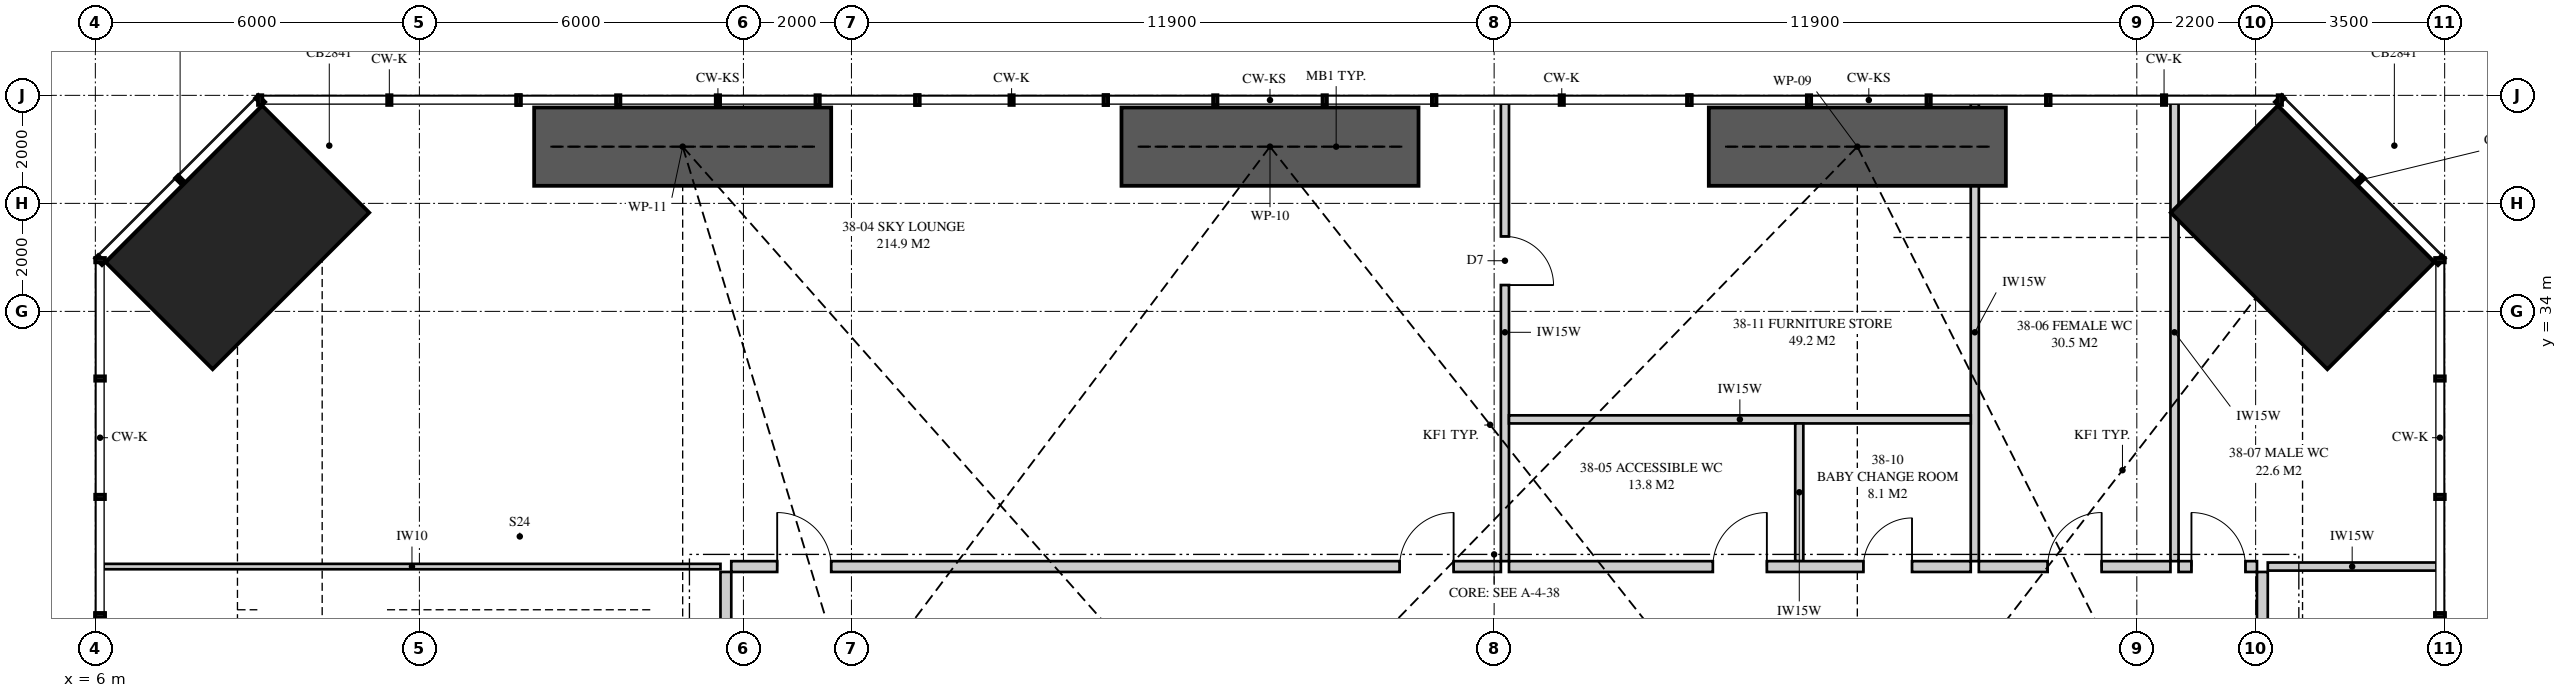
"""IFC4 building model, lengths in metres.
Left out: names, types, materials, properties, quantities, classifications, styles, units other than length and angle.
Written with IfcOpenShell. Run it as: python <this file> out.ifc"""

import sys

from ifc_helpers import new_model, si_unit, direction, frame, frame_2d, origin, origin_2d, place, context, subcontext, project, spatial, polyline, rectangle, hollow_rectangle, outline, extrude, element, fill, save


model = new_model("IFC4")
c1 = context("Model", 3, precision=1e-05, world=origin(), true_north=direction((0.0, 1.0)))
c2 = subcontext(c1, "Body", "Model", "MODEL_VIEW")
j1 = project(units=[si_unit("LENGTHUNIT", "METRE"), si_unit("PLANEANGLEUNIT", "RADIAN")], contexts=[c1])
p1 = place(None, origin())
s1 = spatial("IfcSite", under=j1, at=p1, CompositionType="ELEMENT")
p2 = place(p1, origin())
s2 = spatial("IfcBuilding", under=s1, at=p2, CompositionType="ELEMENT")
p3 = place(p2, frame((0.0, 0.0, 138.35)))
s3 = spatial("IfcBuildingStorey", under=s2, at=p3, CompositionType="ELEMENT", Elevation=138.35)
for number, where, z_axis, x_axis in (
    (1, (46.869, 35.369, 0.0), (0.0, 0.0, 1.0), (-0.707, -0.707, 0.0)),
    (2, (8.631, 35.369, 0.0), (0.0, 0.0, 1.0), (0.707, -0.707, 0.0)),
):
    element("IfcColumn", number, at=place(p3, frame(where, z_axis=z_axis, x_axis=x_axis)), inside=s3, PredefinedType="COLUMN", context=c2, shape_type="SweptSolid", body=[
        extrude(hollow_rectangle(XDim=2.8, YDim=4.1, WallThickness=0.125, at=origin_2d()), origin(), (0.0, 0.0, 1.0), 6.0),
    ])
p4 = place(p3, frame((17.775, 29.275, 0.0), z_axis=(0.0, 0.0, 1.0), x_axis=(1.0, 0.0, 0.0)))
e3 = element("IfcWall", 3, at=p4, inside=s3, PredefinedType="PARTITIONING", context=c2, shape_type="SweptSolid", body=[
    extrude(outline(polyline([(0.0, 0.0), (14.25, 0.0), (14.25, 5.72), (13.709, 5.72), (13.709, 5.141), (12.856, 5.141), (12.856, 5.72), (10.26, 5.72), (10.26, 5.208), (9.69, 5.208), (9.69, 5.72), (6.392, 5.72), (6.392, 5.141), (5.584, 5.141), (5.584, 5.72), (4.496, 5.72), (4.496, 5.141), (3.754, 5.141), (3.754, 5.72), (1.736, 5.72), (1.736, 5.141), (1.182, 5.141), (1.182, 5.72), (0.0, 5.72), (0.0, 0.0)])), frame((0.0, 0.1, 0.0), z_axis=(0.0, -1.0, 0.0), x_axis=(1.0, 0.0, 0.0)), (0.0, 0.0, 1.0), 0.2),
])
p5 = place(p4, frame((0.85, 0.0, 0.0)))
e4 = element("IfcOpeningElement", 4, at=p5, cuts=e3, PredefinedType="OPENING", context=c2, shape_type="SweptSolid", body=[
    extrude(rectangle(XDim=1.0, YDim=2.1, at=frame_2d((0.5, 1.05))), frame((0.0, 0.11, 0.0), z_axis=(0.0, -1.0, 0.0), x_axis=(1.0, 0.0, 0.0)), (0.0, 0.0, 1.0), 0.22),
])
p6 = place(p4, frame((12.375, 0.0, 0.0)))
e5 = element("IfcOpeningElement", 5, at=p6, cuts=e3, PredefinedType="OPENING", context=c2, shape_type="SweptSolid", body=[
    extrude(rectangle(XDim=1.0, YDim=2.1, at=frame_2d((0.5, 1.05))), frame((0.0, 0.11, 0.0), z_axis=(0.0, -1.0, 0.0), x_axis=(1.0, 0.0, 0.0)), (0.0, 0.0, 1.0), 0.22),
])
p7 = place(p3, frame((32.175, 29.275, 0.0), z_axis=(0.0, 0.0, 1.0), x_axis=(1.0, 0.0, 0.0)))
e6 = element("IfcWall", 6, at=p7, inside=s3, PredefinedType="PARTITIONING", context=c2, shape_type="SweptSolid", body=[
    extrude(outline(polyline([(0.0, 0.0), (8.55, 0.0), (8.55, 5.72), (7.16, 5.72), (7.16, 5.12), (5.74, 5.12), (5.74, 5.72), (2.107, 5.72), (2.107, 5.141), (1.347, 5.141), (1.347, 5.72), (0.0, 5.72), (0.0, 0.0)])), frame((0.0, 0.1, 0.0), z_axis=(0.0, -1.0, 0.0), x_axis=(1.0, 0.0, 0.0)), (0.0, 0.0, 1.0), 0.2),
])
p8 = place(p7, frame((3.775, 0.0, 0.0)))
e7 = element("IfcOpeningElement", 7, at=p8, cuts=e6, PredefinedType="OPENING", context=c2, shape_type="SweptSolid", body=[
    extrude(rectangle(XDim=1.0, YDim=2.1, at=frame_2d((0.5, 1.05))), frame((0.0, 0.11, 0.0), z_axis=(0.0, -1.0, 0.0), x_axis=(1.0, 0.0, 0.0)), (0.0, 0.0, 1.0), 0.22),
])
p9 = place(p7, frame((6.562, 0.0, 0.0)))
e8 = element("IfcOpeningElement", 8, at=p9, cuts=e6, PredefinedType="OPENING", context=c2, shape_type="SweptSolid", body=[
    extrude(rectangle(XDim=0.9, YDim=2.1, at=frame_2d((0.45, 1.05))), frame((0.0, 0.11, 0.0), z_axis=(0.0, -1.0, 0.0), x_axis=(1.0, 0.0, 0.0)), (0.0, 0.0, 1.0), 0.22),
])
p10 = place(p3, frame((40.875, 29.275, 0.0), z_axis=(0.0, 0.0, 1.0), x_axis=(1.0, 0.0, 0.0)))
e9 = element("IfcWall", 9, at=p10, inside=s3, PredefinedType="PARTITIONING", context=c2, shape_type="SweptSolid", body=[
    extrude(outline(polyline([(0.0, 0.0), (3.548, 0.0), (3.548, 5.72), (1.971, 5.72), (1.971, 5.141), (0.903, 5.141), (0.903, 5.72), (0.0, 5.72), (0.0, 0.0)])), frame((0.0, 0.1, 0.0), z_axis=(0.0, -1.0, 0.0), x_axis=(1.0, 0.0, 0.0)), (0.0, 0.0, 1.0), 0.2),
])
p11 = place(p10, frame((1.274, 0.0, 0.0)))
e10 = element("IfcOpeningElement", 10, at=p11, cuts=e9, PredefinedType="OPENING", context=c2, shape_type="SweptSolid", body=[
    extrude(rectangle(XDim=1.0, YDim=2.1, at=frame_2d((0.5, 1.05))), frame((0.0, 0.11, 0.0), z_axis=(0.0, -1.0, 0.0), x_axis=(1.0, 0.0, 0.0)), (0.0, 0.0, 1.0), 0.22),
])
p12 = place(p3, frame((44.573, 29.275, 0.0), z_axis=(0.0, 0.0, 1.0), x_axis=(1.0, 0.0, 0.0)))
e11 = element("IfcWall", 11, at=p12, inside=s3, PredefinedType="PARTITIONING", context=c2, shape_type="SweptSolid", body=[
    extrude(rectangle(XDim=1.452, YDim=0.2, at=frame_2d((0.726, 0.0))), origin(), (0.0, 0.0, 1.0), 5.72),
])
p13 = place(p12, frame((0.239, 0.0, 0.0)))
e12 = element("IfcOpeningElement", 12, at=p13, cuts=e11, PredefinedType="OPENING", context=c2, shape_type="SweptSolid", body=[
    extrude(rectangle(XDim=1.0, YDim=2.1, at=frame_2d((0.5, 1.05))), frame((0.0, 0.11, 0.0), z_axis=(0.0, -1.0, 0.0), x_axis=(1.0, 0.0, 0.0)), (0.0, 0.0, 1.0), 0.22),
])
for number, where, z_axis, x_axis in (
    (13, (17.675, 27.625, 0.0), (0.0, 0.0, 1.0), (0.0, 1.0, 0.0)),
    (14, (46.125, 27.625, 0.0), (0.0, 0.0, 1.0), (0.0, 1.0, 0.0)),
):
    element("IfcWall", number, at=place(p3, frame(where, z_axis=z_axis, x_axis=x_axis)), inside=s3, PredefinedType="PARTITIONING", context=c2, shape_type="SweptSolid", body=[
        extrude(rectangle(XDim=1.55, YDim=0.2, at=frame_2d((0.775, 0.0))), origin(), (0.0, 0.0, 1.0), 5.72),
    ])
p14 = place(p3, frame((32.1, 29.375, 0.0), z_axis=(0.0, 0.0, 1.0), x_axis=(0.0, 1.0, 0.0)))
e15 = element("IfcWall", 15, at=p14, inside=s3, PredefinedType="PLUMBINGWALL", context=c2, shape_type="SweptSolid", body=[
    extrude(outline(polyline([(0.0, 0.0), (8.475, 0.0), (8.475, 5.72), (8.375, 5.72), (8.375, 4.32), (6.975, 4.32), (6.975, 5.72), (2.653, 5.72), (2.653, 5.141), (1.702, 5.141), (1.702, 5.72), (1.387, 5.72), (1.387, 5.141), (0.555, 5.141), (0.555, 5.72), (0.0, 5.72), (0.0, 0.0)])), frame((0.0, 0.075, 0.0), z_axis=(0.0, -1.0, 0.0), x_axis=(1.0, 0.0, 0.0)), (0.0, 0.0, 1.0), 0.15),
])
p15 = place(p14, frame((5.113, 0.0, 0.0)))
e16 = element("IfcOpeningElement", 16, at=p15, cuts=e15, PredefinedType="OPENING", context=c2, shape_type="SweptSolid", body=[
    extrude(rectangle(XDim=0.9, YDim=2.1, at=frame_2d((0.45, 1.05))), frame((0.0, 0.085, 0.0), z_axis=(0.0, -1.0, 0.0), x_axis=(1.0, 0.0, 0.0)), (0.0, 0.0, 1.0), 0.17),
])
p16 = place(p3, frame((6.15, 29.275, 0.0), z_axis=(0.0, 0.0, 1.0), x_axis=(1.0, 0.0, 0.0)))
e17 = element("IfcWall", 17, at=p16, inside=s3, PredefinedType="PARTITIONING", context=c2, shape_type="SweptSolid", body=[
    extrude(outline(polyline([(0.0, 0.0), (11.425, 0.0), (11.425, 5.72), (11.385, 5.72), (11.385, 5.12), (10.065, 5.12), (10.065, 5.72), (5.31, 5.72), (5.31, 5.12), (2.841, 5.12), (2.841, 4.52), (2.21, 4.52), (2.21, 4.32), (0.776, 4.32), (0.776, 5.72), (0.0, 5.72), (0.0, 0.0)])), frame((0.0, 0.05, 0.0), z_axis=(0.0, -1.0, 0.0), x_axis=(1.0, 0.0, 0.0)), (0.0, 0.0, 1.0), 0.1),
])
p17 = place(p3, frame((40.8, 29.375, 0.0), z_axis=(0.0, 0.0, 1.0), x_axis=(0.0, 1.0, 0.0)))
e18 = element("IfcWall", 18, at=p17, inside=s3, PredefinedType="PLUMBINGWALL", context=c2, shape_type="SweptSolid", body=[
    extrude(outline(polyline([(2.671, 5.72), (0.0, 5.72), (0.0, 0.0), (7.429, 0.0), (7.429, 0.279), (7.921, 0.279), (7.921, 0.0), (8.475, 0.0), (8.475, 5.72), (7.961, 5.72), (7.961, 4.32), (6.502, 4.32), (6.502, 5.12), (5.309, 5.12), (5.309, 5.72), (4.021, 5.72), (4.021, 5.141), (2.671, 5.141), (2.671, 5.72)])), frame((0.0, 0.075, 0.0), z_axis=(0.0, -1.0, 0.0), x_axis=(1.0, 0.0, 0.0)), (0.0, 0.0, 1.0), 0.15),
])
p18 = place(p3, frame((44.498, 29.375, 0.0), z_axis=(0.0, 0.0, 1.0), x_axis=(0.0, 1.0, 0.0)))
e19 = element("IfcWall", 19, at=p18, inside=s3, PredefinedType="PLUMBINGWALL", context=c2, shape_type="SweptSolid", body=[
    extrude(outline(polyline([(0.0, 0.0), (8.475, 0.0), (8.475, 5.72), (7.207, 5.72), (7.207, 4.32), (5.747, 4.32), (5.747, 5.12), (5.309, 5.12), (5.309, 5.72), (3.413, 5.72), (3.413, 5.141), (2.447, 5.141), (2.447, 5.72), (0.0, 5.72), (0.0, 0.0)])), frame((0.0, 0.075, 0.0), z_axis=(0.0, -1.0, 0.0), x_axis=(1.0, 0.0, 0.0)), (0.0, 0.0, 1.0), 0.15),
])
p19 = place(p3, frame((46.225, 29.275, 0.0), z_axis=(0.0, 0.0, 1.0), x_axis=(1.0, 0.0, 0.0)))
e20 = element("IfcWall", 20, at=p19, inside=s3, PredefinedType="PLUMBINGWALL", context=c2, shape_type="SweptSolid", body=[
    extrude(outline(polyline([(0.0, 0.0), (3.125, 0.0), (3.125, 5.72), (2.353, 5.72), (2.353, 4.32), (0.91, 4.32), (0.91, 5.12), (0.0, 5.12), (0.0, 0.0)])), frame((0.0, 0.075, 0.0), z_axis=(0.0, -1.0, 0.0), x_axis=(1.0, 0.0, 0.0)), (0.0, 0.0, 1.0), 0.15),
])
p20 = place(p3, frame((32.175, 32.0, 0.0), z_axis=(0.0, 0.0, 1.0), x_axis=(1.0, 0.0, 0.0)))
e21 = element("IfcWall", 21, at=p20, inside=s3, PredefinedType="PLUMBINGWALL", context=c2, shape_type="SweptSolid", body=[
    extrude(outline(polyline([(0.0, 0.0), (8.55, 0.0), (8.55, 5.72), (7.135, 5.72), (7.135, 5.12), (5.765, 5.12), (5.765, 5.72), (1.938, 5.72), (1.938, 5.141), (1.132, 5.141), (1.132, 5.72), (0.0, 5.72), (0.0, 0.0)])), frame((0.0, 0.075, 0.0), z_axis=(0.0, -1.0, 0.0), x_axis=(1.0, 0.0, 0.0)), (0.0, 0.0, 1.0), 0.15),
])
p21 = place(p3, frame((37.55, 29.375, 0.0), z_axis=(0.0, 0.0, 1.0), x_axis=(0.0, 1.0, 0.0)))
e22 = element("IfcWall", 22, at=p21, inside=s3, PredefinedType="PLUMBINGWALL", context=c2, shape_type="SweptSolid", body=[
    extrude(rectangle(XDim=2.55, YDim=0.15, at=frame_2d((1.275, 0.0))), origin(), (0.0, 0.0, 1.0), 5.72),
])
for number, where, z_axis, x_axis in (
    (23, (35.875, 37.05, 0.0), (0.0, 0.0, 1.0), (1.0, 0.0, 0.0)),
    (24, (25.0, 37.05, 0.0), (0.0, 0.0, 1.0), (1.0, 0.0, 0.0)),
    (25, (14.125, 37.05, 0.0), (0.0, 0.0, 1.0), (1.0, 0.0, 0.0)),
):
    element("IfcWall", number, at=place(p3, frame(where, z_axis=z_axis, x_axis=x_axis)), inside=s3, PredefinedType="SHEAR", context=c2, shape_type="SweptSolid", body=[
        extrude(rectangle(XDim=5.5, YDim=1.45, at=frame_2d((2.75, 0.0))), origin(), (0.0, 0.0, 1.0), 6.0),
    ])
p22 = place(p5, origin())
e26 = element("IfcDoor", 26, at=p22, inside=s3, OperationType="SINGLE_SWING_LEFT", PredefinedType="DOOR", context=c2, shape_type="SweptSolid", body=[
    extrude(rectangle(XDim=1.0, YDim=2.1, at=frame_2d((0.5, 1.05))), frame((0.0, 0.025, 0.0), z_axis=(0.0, -1.0, 0.0), x_axis=(1.0, 0.0, 0.0)), (0.0, 0.0, 1.0), 0.05),
])
fill(e4, e26)
p23 = place(p6, origin())
e27 = element("IfcDoor", 27, at=p23, inside=s3, OperationType="SINGLE_SWING_RIGHT", PredefinedType="DOOR", context=c2, shape_type="SweptSolid", body=[
    extrude(rectangle(XDim=1.0, YDim=2.1, at=frame_2d((0.5, 1.05))), frame((0.0, 0.025, 0.0), z_axis=(0.0, -1.0, 0.0), x_axis=(1.0, 0.0, 0.0)), (0.0, 0.0, 1.0), 0.05),
])
fill(e5, e27)
p24 = place(p8, origin())
e28 = element("IfcDoor", 28, at=p24, inside=s3, OperationType="SINGLE_SWING_RIGHT", PredefinedType="DOOR", context=c2, shape_type="SweptSolid", body=[
    extrude(rectangle(XDim=1.0, YDim=2.1, at=frame_2d((0.5, 1.05))), frame((0.0, 0.025, 0.0), z_axis=(0.0, -1.0, 0.0), x_axis=(1.0, 0.0, 0.0)), (0.0, 0.0, 1.0), 0.05),
])
fill(e7, e28)
p25 = place(p11, origin())
e29 = element("IfcDoor", 29, at=p25, inside=s3, OperationType="SINGLE_SWING_RIGHT", PredefinedType="DOOR", context=c2, shape_type="SweptSolid", body=[
    extrude(rectangle(XDim=1.0, YDim=2.1, at=frame_2d((0.5, 1.05))), frame((0.0, 0.025, 0.0), z_axis=(0.0, -1.0, 0.0), x_axis=(1.0, 0.0, 0.0)), (0.0, 0.0, 1.0), 0.05),
])
fill(e10, e29)
p26 = place(p13, origin())
e30 = element("IfcDoor", 30, at=p26, inside=s3, OperationType="SINGLE_SWING_LEFT", PredefinedType="DOOR", context=c2, shape_type="SweptSolid", body=[
    extrude(rectangle(XDim=1.0, YDim=2.1, at=frame_2d((0.5, 1.05))), frame((0.0, 0.025, 0.0), z_axis=(0.0, -1.0, 0.0), x_axis=(1.0, 0.0, 0.0)), (0.0, 0.0, 1.0), 0.05),
])
fill(e12, e30)
p27 = place(p9, origin())
e31 = element("IfcDoor", 31, at=p27, inside=s3, OperationType="SINGLE_SWING_RIGHT", PredefinedType="DOOR", context=c2, shape_type="SweptSolid", body=[
    extrude(rectangle(XDim=0.9, YDim=2.1, at=frame_2d((0.45, 1.05))), frame((0.0, 0.025, 0.0), z_axis=(0.0, -1.0, 0.0), x_axis=(1.0, 0.0, 0.0)), (0.0, 0.0, 1.0), 0.05),
])
fill(e8, e31)
p28 = place(p15, frame((0.9, 0.0, 0.0), z_axis=(0.0, 0.0, 1.0), x_axis=(-1.0, 0.0, 0.0)))
e32 = element("IfcDoor", 32, at=p28, inside=s3, OperationType="SINGLE_SWING_RIGHT", PredefinedType="DOOR", context=c2, shape_type="SweptSolid", body=[
    extrude(rectangle(XDim=0.9, YDim=2.1, at=frame_2d((0.45, 1.05))), frame((0.0, 0.025, 0.0), z_axis=(0.0, -1.0, 0.0), x_axis=(1.0, 0.0, 0.0)), (0.0, 0.0, 1.0), 0.05),
])
fill(e16, e32)
save(model, sys.argv[1])
